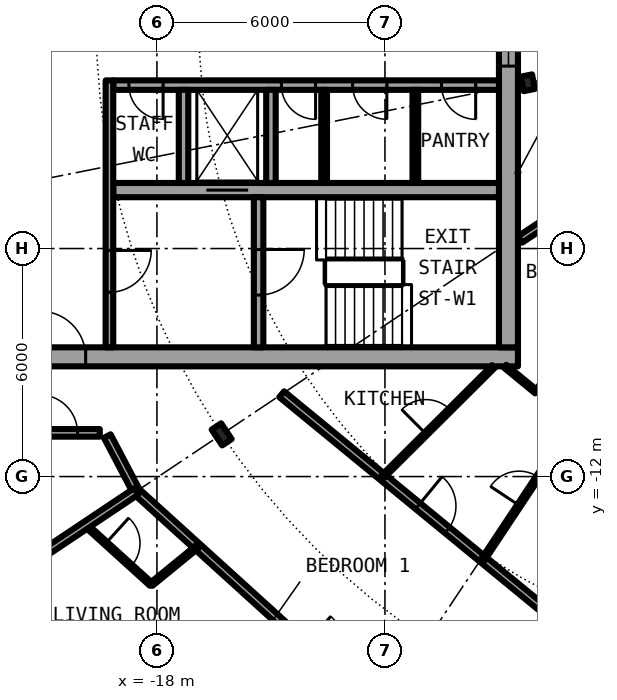
"""IFC4 building model, lengths in metres.
Left out: names, types, materials, properties, quantities, classifications, styles, units other than length and angle.
Written with IfcOpenShell. Run it as: python <this file> out.ifc"""

import sys

from ifc_helpers import new_model, si_unit, direction, frame, frame_2d, origin, origin_2d, place, context, subcontext, project, spatial, rectangle, i_section, extrude, element, fill, save


model = new_model("IFC4")
c1 = context("Model", 3, precision=1e-05, world=origin(), true_north=direction((0.0, 1.0)))
c2 = subcontext(c1, "Body", "Model", "MODEL_VIEW")
j1 = project(units=[si_unit("LENGTHUNIT", "METRE"), si_unit("PLANEANGLEUNIT", "RADIAN")], contexts=[c1])
p1 = place(None, origin())
s1 = spatial("IfcSite", under=j1, at=p1, CompositionType="ELEMENT")
p2 = place(p1, origin())
s2 = spatial("IfcBuilding", under=s1, at=p2, CompositionType="ELEMENT")
p3 = place(p2, frame((0.0, 0.0, 161.6)))
s3 = spatial("IfcBuildingStorey", under=s2, at=p3, CompositionType="ELEMENT", Elevation=161.6)
p4 = place(p3, frame((-16.297, -10.889, 0.0), z_axis=(0.0, 0.0, 1.0), x_axis=(-0.831469612303, -0.55557023302, 0.0)))
e1 = element("IfcColumn", 1, at=p4, inside=s3, PredefinedType="COLUMN", context=c2, shape_type="SweptSolid", body=[
    extrude(i_section(OverallWidth=0.3, OverallDepth=0.5, WebThickness=0.014, FlangeThickness=0.028, FilletRadius=0.027, at=origin_2d()), origin(), (0.0, 0.0, 1.0), 3.05),
])
p5 = place(p3, frame((-8.239, -1.639, 0.0), z_axis=(0.0, 0.0, 1.0), x_axis=(-0.980785280403, -0.195090322016, 0.0)))
e2 = element("IfcColumn", 2, at=p5, inside=s3, PredefinedType="COLUMN", context=c2, shape_type="SweptSolid", body=[
    extrude(i_section(OverallWidth=0.3, OverallDepth=0.39, WebThickness=0.011, FlangeThickness=0.019, FilletRadius=0.027, at=origin_2d()), origin(), (0.0, 0.0, 1.0), 3.05),
])
p6 = place(p3, frame((-22.699, -15.167, 0.0), z_axis=(0.0, 0.0, 1.0), x_axis=(0.634382322723, -0.773019449054, 0.0)))
e3 = element("IfcWall", 3, at=p6, inside=s3, PredefinedType="SOLIDWALL", context=c2, shape_type="SweptSolid", body=[
    extrude(rectangle(XDim=5.352, YDim=0.25, at=frame_2d((2.676, 0.0))), origin(), (0.0, 0.0, 1.0), 2.7),
])
p7 = place(p6, frame((0.441, 0.0, 0.3)))
e4 = element("IfcOpeningElement", 4, at=p7, cuts=e3, PredefinedType="OPENING", context=c2, shape_type="SweptSolid", body=[
    extrude(rectangle(XDim=1.8, YDim=2.1, at=frame_2d((0.9, 1.05))), frame((0.0, 0.135, 0.0), z_axis=(0.0, -1.0, 0.0), x_axis=(1.0, 0.0, 0.0)), (0.0, 0.0, 1.0), 0.27),
])
p8 = place(p6, frame((3.51, 0.0, 0.0)))
e5 = element("IfcOpeningElement", 5, at=p8, cuts=e3, PredefinedType="OPENING", context=c2, shape_type="SweptSolid", body=[
    extrude(rectangle(XDim=1.0, YDim=2.2, at=frame_2d((0.5, 1.1))), frame((0.0, 0.135, 0.0), z_axis=(0.0, -1.0, 0.0), x_axis=(1.0, 0.0, 0.0)), (0.0, 0.0, 1.0), 0.27),
])
p9 = place(p3, frame((-22.1, -8.85, 0.0), z_axis=(0.0, 0.0, 1.0), x_axis=(1.0, 0.0, 0.0)))
e6 = element("IfcWall", 6, at=p9, inside=s3, PredefinedType="SHEAR", context=c2, shape_type="SweptSolid", body=[
    extrude(rectangle(XDim=13.6, YDim=0.5, at=frame_2d((6.8, 0.0))), origin(), (0.0, 0.0, 1.0), 3.05),
])
p10 = place(p9, frame((1.025, 0.0, 0.0)))
e7 = element("IfcOpeningElement", 7, at=p10, cuts=e6, PredefinedType="OPENING", context=c2, shape_type="SweptSolid", body=[
    extrude(rectangle(XDim=1.2, YDim=2.3, at=frame_2d((0.6, 1.15))), frame((0.0, 0.26, 0.0), z_axis=(0.0, -1.0, 0.0), x_axis=(1.0, 0.0, 0.0)), (0.0, 0.0, 1.0), 0.52),
])
p11 = place(p3, frame((-8.75, 8.6, 0.0), z_axis=(0.0, 0.0, 1.0), x_axis=(0.0, -1.0, 0.0)))
e8 = element("IfcWall", 8, at=p11, inside=s3, PredefinedType="SHEAR", context=c2, shape_type="SweptSolid", body=[
    extrude(rectangle(XDim=17.2, YDim=0.5, at=frame_2d((8.6, 0.0))), origin(), (0.0, 0.0, 1.0), 3.05),
])
p12 = place(p11, frame((7.4, 0.0, 0.1)))
e9 = element("IfcOpeningElement", 9, at=p12, cuts=e8, PredefinedType="OPENING", context=c2, shape_type="SweptSolid", body=[
    extrude(rectangle(XDim=2.4, YDim=2.2, at=frame_2d((1.2, 1.1))), frame((0.0, 0.26, 0.0), z_axis=(0.0, -1.0, 0.0), x_axis=(1.0, 0.0, 0.0)), (0.0, 0.0, 1.0), 0.52),
])
p13 = place(p3, frame((-9.0, -1.7, 0.0), z_axis=(0.0, 0.0, 1.0), x_axis=(-1.0, 0.0, 0.0)))
e10 = element("IfcWall", 10, at=p13, inside=s3, PredefinedType="SHEAR", context=c2, shape_type="SweptSolid", body=[
    extrude(rectangle(XDim=10.15, YDim=0.25, at=frame_2d((5.075, 0.0))), origin(), (0.0, 0.0, 1.0), 3.05),
])
p14 = place(p13, frame((0.613, 0.0, 0.0)))
e11 = element("IfcOpeningElement", 11, at=p14, cuts=e10, PredefinedType="OPENING", context=c2, shape_type="SweptSolid", body=[
    extrude(rectangle(XDim=0.9, YDim=2.3, at=frame_2d((0.45, 1.15))), frame((0.0, 0.135, 0.0), z_axis=(0.0, -1.0, 0.0), x_axis=(1.0, 0.0, 0.0)), (0.0, 0.0, 1.0), 0.27),
])
p15 = place(p13, frame((2.95, 0.0, 0.0)))
e12 = element("IfcOpeningElement", 12, at=p15, cuts=e10, PredefinedType="OPENING", context=c2, shape_type="SweptSolid", body=[
    extrude(rectangle(XDim=0.9, YDim=2.3, at=frame_2d((0.45, 1.15))), frame((0.0, 0.135, 0.0), z_axis=(0.0, -1.0, 0.0), x_axis=(1.0, 0.0, 0.0)), (0.0, 0.0, 1.0), 0.27),
])
p16 = place(p13, frame((4.825, 0.0, 0.0)))
e13 = element("IfcOpeningElement", 13, at=p16, cuts=e10, PredefinedType="OPENING", context=c2, shape_type="SweptSolid", body=[
    extrude(rectangle(XDim=0.9, YDim=2.3, at=frame_2d((0.45, 1.15))), frame((0.0, 0.135, 0.0), z_axis=(0.0, -1.0, 0.0), x_axis=(1.0, 0.0, 0.0)), (0.0, 0.0, 1.0), 0.27),
])
p17 = place(p13, frame((8.837, 0.0, 0.0)))
e14 = element("IfcOpeningElement", 14, at=p17, cuts=e10, PredefinedType="OPENING", context=c2, shape_type="SweptSolid", body=[
    extrude(rectangle(XDim=0.9, YDim=2.3, at=frame_2d((0.45, 1.15))), frame((0.0, 0.135, 0.0), z_axis=(0.0, -1.0, 0.0), x_axis=(1.0, 0.0, 0.0)), (0.0, 0.0, 1.0), 0.27),
])
p18 = place(p3, frame((-9.0, -4.462, 0.0), z_axis=(0.0, 0.0, 1.0), x_axis=(-1.0, 0.0, 0.0)))
e15 = element("IfcWall", 15, at=p18, inside=s3, PredefinedType="SHEAR", context=c2, shape_type="SweptSolid", body=[
    extrude(rectangle(XDim=10.15, YDim=0.375, at=frame_2d((5.075, 0.0))), origin(), (0.0, 0.0, 1.0), 3.05),
])
p19 = place(p18, frame((6.6, 0.0, 0.0)))
e16 = element("IfcOpeningElement", 16, at=p19, cuts=e15, PredefinedType="OPENING", context=c2, shape_type="SweptSolid", body=[
    extrude(rectangle(XDim=1.1, YDim=2.3, at=frame_2d((0.55, 1.15))), frame((0.0, 0.198, 0.0), z_axis=(0.0, -1.0, 0.0), x_axis=(1.0, 0.0, 0.0)), (0.0, 0.0, 1.0), 0.395),
])
p20 = place(p3, frame((-15.325, -4.65, 0.0), z_axis=(0.0, 0.0, 1.0), x_axis=(0.0, -1.0, 0.0)))
e17 = element("IfcWall", 17, at=p20, inside=s3, PredefinedType="SHEAR", context=c2, shape_type="SweptSolid", body=[
    extrude(rectangle(XDim=3.95, YDim=0.25, at=frame_2d((1.975, 0.0))), origin(), (0.0, 0.0, 1.0), 3.05),
])
p21 = place(p20, frame((1.375, 0.0, 0.0)))
e18 = element("IfcOpeningElement", 18, at=p21, cuts=e17, PredefinedType="OPENING", context=c2, shape_type="SweptSolid", body=[
    extrude(rectangle(XDim=1.2, YDim=2.3, at=frame_2d((0.6, 1.15))), frame((0.0, 0.135, 0.0), z_axis=(0.0, -1.0, 0.0), x_axis=(1.0, 0.0, 0.0)), (0.0, 0.0, 1.0), 0.27),
])
for number, where, z_axis, x_axis in (
    (19, (-15.0, -1.825, 0.0), (0.0, 0.0, 1.0), (0.0, -1.0, 0.0)),
    (20, (-17.3, -1.825, 0.0), (0.0, 0.0, 1.0), (0.0, -1.0, 0.0)),
):
    element("IfcWall", number, at=place(p3, frame(where, z_axis=z_axis, x_axis=x_axis)), inside=s3, PredefinedType="SOLIDWALL", context=c2, shape_type="SweptSolid", body=[
        extrude(rectangle(XDim=2.45, YDim=0.25, at=frame_2d((1.225, 0.0))), origin(), (0.0, 0.0, 1.0), 2.7),
    ])
p22 = place(p3, frame((-19.25, -1.575, 0.0), z_axis=(0.0, 0.0, 1.0), x_axis=(0.0, -1.0, 0.0)))
e21 = element("IfcWall", 21, at=p22, inside=s3, PredefinedType="SOLIDWALL", context=c2, shape_type="SweptSolid", body=[
    extrude(rectangle(XDim=7.025, YDim=0.2, at=frame_2d((3.513, 0.0))), origin(), (0.0, 0.0, 1.0), 2.7),
])
p23 = place(p22, frame((4.475, 0.0, 0.0)))
e22 = element("IfcOpeningElement", 22, at=p23, cuts=e21, PredefinedType="OPENING", context=c2, shape_type="SweptSolid", body=[
    extrude(rectangle(XDim=1.1, YDim=2.3, at=frame_2d((0.55, 1.15))), frame((0.0, 0.11, 0.0), z_axis=(0.0, -1.0, 0.0), x_axis=(1.0, 0.0, 0.0)), (0.0, 0.0, 1.0), 0.22),
])
for number, where, z_axis, x_axis in (
    (23, (-11.2, -1.825, 0.0), (0.0, 0.0, 1.0), (0.0, -1.0, 0.0)),
    (24, (-13.6, -1.825, 0.0), (0.0, 0.0, 1.0), (0.0, -1.0, 0.0)),
):
    element("IfcWall", number, at=place(p3, frame(where, z_axis=z_axis, x_axis=x_axis)), inside=s3, PredefinedType="PARTITIONING", context=c2, shape_type="SweptSolid", body=[
        extrude(rectangle(XDim=2.45, YDim=0.15, at=frame_2d((1.225, 0.0))), origin(), (0.0, 0.0, 1.0), 2.7),
    ])
p24 = place(p3, frame((-19.872, -13.278, 0.0), z_axis=(0.0, 0.0, 1.0), x_axis=(0.740990220108, -0.671515817911, 0.0)))
e25 = element("IfcWall", 25, at=p24, inside=s3, PredefinedType="PARTITIONING", context=c2, shape_type="SweptSolid", body=[
    extrude(rectangle(XDim=2.323, YDim=0.1, at=frame_2d((1.161, 0.0))), origin(), (0.0, 0.0, 1.0), 2.7),
])
p25 = place(p24, frame((0.711, 0.0, 0.0)))
e26 = element("IfcOpeningElement", 26, at=p25, cuts=e25, PredefinedType="OPENING", context=c2, shape_type="SweptSolid", body=[
    extrude(rectangle(XDim=0.9, YDim=2.3, at=frame_2d((0.45, 1.15))), frame((0.0, 0.06, 0.0), z_axis=(0.0, -1.0, 0.0), x_axis=(1.0, 0.0, 0.0)), (0.0, 0.0, 1.0), 0.12),
])
p26 = place(p3, frame((-19.307, -10.935, 0.0), z_axis=(0.0, 0.0, 1.0), x_axis=(0.465605550524, -0.884992356646, 0.0)))
e27 = element("IfcWall", 27, at=p26, inside=s3, PredefinedType="PARTITIONING", context=c2, shape_type="SweptSolid", body=[
    extrude(rectangle(XDim=1.643, YDim=0.2, at=frame_2d((0.821, 0.0))), origin(), (0.0, 0.0, 1.0), 2.7),
])
p27 = place(p3, frame((-18.542, -12.389, 0.0), z_axis=(0.0, 0.0, 1.0), x_axis=(0.740947367223, -0.671563101283, 0.0)))
e28 = element("IfcWall", 28, at=p27, inside=s3, PredefinedType="PARTITIONING", context=c2, shape_type="SweptSolid", body=[
    extrude(rectangle(XDim=10.837, YDim=0.2, at=frame_2d((5.419, 0.0))), origin(), (0.0, 0.0, 1.0), 2.7),
])
p28 = place(p27, frame((6.002, 0.0, 0.0)))
e29 = element("IfcOpeningElement", 29, at=p28, cuts=e28, PredefinedType="OPENING", context=c2, shape_type="SweptSolid", body=[
    extrude(rectangle(XDim=1.0, YDim=2.3, at=frame_2d((0.5, 1.15))), frame((0.0, 0.11, 0.0), z_axis=(0.0, -1.0, 0.0), x_axis=(1.0, 0.0, 0.0)), (0.0, 0.0, 1.0), 0.22),
])
p29 = place(p3, frame((-14.717, -9.834, 0.0), z_axis=(0.0, 0.0, 1.0), x_axis=(0.773034536097, -0.634363938131, 0.0)))
e30 = element("IfcWall", 30, at=p29, inside=s3, PredefinedType="PARTITIONING", context=c2, shape_type="SweptSolid", body=[
    extrude(rectangle(XDim=10.277, YDim=0.2, at=frame_2d((5.138, 0.0))), origin(), (0.0, 0.0, 1.0), 2.7),
])
p30 = place(p29, frame((4.638, 0.0, 0.0)))
e31 = element("IfcOpeningElement", 31, at=p30, cuts=e30, PredefinedType="OPENING", context=c2, shape_type="SweptSolid", body=[
    extrude(rectangle(XDim=1.0, YDim=2.3, at=frame_2d((0.5, 1.15))), frame((0.0, 0.11, 0.0), z_axis=(0.0, -1.0, 0.0), x_axis=(1.0, 0.0, 0.0)), (0.0, 0.0, 1.0), 0.22),
])
p31 = place(p3, frame((-8.839, -9.098, 0.0), z_axis=(0.0, 0.0, 1.0), x_axis=(0.7731800648, -0.634186555673, 0.0)))
e32 = element("IfcWall", 32, at=p31, inside=s3, PredefinedType="PARTITIONING", context=c2, shape_type="SweptSolid", body=[
    extrude(rectangle(XDim=1.064, YDim=0.1, at=frame_2d((0.532, 0.0))), origin(), (0.0, 0.0, 1.0), 2.7),
])
p32 = place(p3, frame((-21.675, -10.85, 0.0), z_axis=(0.0, 0.0, 1.0), x_axis=(1.0, 0.0, 0.0)))
e33 = element("IfcWall", 33, at=p32, inside=s3, PredefinedType="PARTITIONING", context=c2, shape_type="SweptSolid", body=[
    extrude(rectangle(XDim=2.171, YDim=0.2, at=frame_2d((1.085, 0.0))), origin(), (0.0, 0.0, 1.0), 2.7),
])
p33 = place(p32, frame((0.585, 0.0, 0.0)))
e34 = element("IfcOpeningElement", 34, at=p33, cuts=e33, PredefinedType="OPENING", context=c2, shape_type="SweptSolid", body=[
    extrude(rectangle(XDim=1.0, YDim=2.3, at=frame_2d((0.5, 1.15))), frame((0.0, 0.11, 0.0), z_axis=(0.0, -1.0, 0.0), x_axis=(1.0, 0.0, 0.0)), (0.0, 0.0, 1.0), 0.22),
])
p34 = place(p3, frame((-6.513, -4.472, 0.0), z_axis=(0.0, 0.0, 1.0), x_axis=(-0.83133816625, -0.555766905579, 0.0)))
e35 = element("IfcWall", 35, at=p34, inside=s3, PredefinedType="PARTITIONING", context=c2, shape_type="SweptSolid", body=[
    extrude(rectangle(XDim=2.323, YDim=0.2, at=frame_2d((1.162, 0.0))), origin(), (0.0, 0.0, 1.0), 2.7),
])
p35 = place(p3, frame((-22.595, -15.098, 0.0), z_axis=(0.0, 0.0, 1.0), x_axis=(0.831387096605, 0.55569370664, 0.0)))
e36 = element("IfcWall", 36, at=p35, inside=s3, PredefinedType="PARTITIONING", context=c2, shape_type="SweptSolid", body=[
    extrude(rectangle(XDim=4.875, YDim=0.2, at=frame_2d((2.438, 0.0))), origin(), (0.0, 0.0, 1.0), 2.7),
])
p36 = place(p3, frame((-18.151, -14.838, 0.0), z_axis=(0.0, 0.0, 1.0), x_axis=(0.774283039722, 0.632839453889, 0.0)))
e37 = element("IfcWall", 37, at=p36, inside=s3, PredefinedType="PARTITIONING", context=c2, shape_type="SweptSolid", body=[
    extrude(rectangle(XDim=1.569, YDim=0.1, at=frame_2d((0.785, 0.0))), origin(), (0.0, 0.0, 1.0), 2.7),
])
p37 = place(p3, frame((-12.065, -12.011, 0.0), z_axis=(0.0, 0.0, 1.0), x_axis=(0.708793214553, 0.705416316088, 0.0)))
e38 = element("IfcWall", 38, at=p37, inside=s3, PredefinedType="PARTITIONING", context=c2, shape_type="SweptSolid", body=[
    extrude(rectangle(XDim=4.121, YDim=0.1, at=frame_2d((2.061, 0.0))), origin(), (0.0, 0.0, 1.0), 2.7),
])
p38 = place(p37, frame((1.611, 0.0, 0.0)))
e39 = element("IfcOpeningElement", 39, at=p38, cuts=e38, PredefinedType="OPENING", context=c2, shape_type="SweptSolid", body=[
    extrude(rectangle(XDim=0.9, YDim=2.3, at=frame_2d((0.45, 1.15))), frame((0.0, 0.06, 0.0), z_axis=(0.0, -1.0, 0.0), x_axis=(1.0, 0.0, 0.0)), (0.0, 0.0, 1.0), 0.12),
])
p39 = place(p3, frame((-9.418, -14.182, 0.0), z_axis=(0.0, 0.0, 1.0), x_axis=(0.553303732327, 0.832979579457, 0.0)))
e40 = element("IfcWall", 40, at=p39, inside=s3, PredefinedType="PARTITIONING", context=c2, shape_type="SweptSolid", body=[
    extrude(rectangle(XDim=4.319, YDim=0.1, at=frame_2d((2.16, 0.0))), origin(), (0.0, 0.0, 1.0), 2.7),
])
p40 = place(p39, frame((1.71, 0.0, 0.0)))
e41 = element("IfcOpeningElement", 41, at=p40, cuts=e40, PredefinedType="OPENING", context=c2, shape_type="SweptSolid", body=[
    extrude(rectangle(XDim=0.9, YDim=2.3, at=frame_2d((0.45, 1.15))), frame((0.0, 0.06, 0.0), z_axis=(0.0, -1.0, 0.0), x_axis=(1.0, 0.0, 0.0)), (0.0, 0.0, 1.0), 0.12),
])
p41 = place(p3, frame((-8.019, -9.771, 0.0), z_axis=(0.0, 0.0, 1.0), x_axis=(0.634401778971, 0.773003481776, 0.0)))
e42 = element("IfcWall", 42, at=p41, inside=s3, PredefinedType="PARTITIONING", context=c2, shape_type="SweptSolid", body=[
    extrude(rectangle(XDim=4.92, YDim=0.1, at=frame_2d((2.46, 0.0))), origin(), (0.0, 0.0, 1.0), 2.7),
])
p42 = place(p41, frame((2.01, 0.0, 0.0)))
e43 = element("IfcOpeningElement", 43, at=p42, cuts=e42, PredefinedType="OPENING", context=c2, shape_type="SweptSolid", body=[
    extrude(rectangle(XDim=0.9, YDim=2.3, at=frame_2d((0.45, 1.15))), frame((0.0, 0.06, 0.0), z_axis=(0.0, -1.0, 0.0), x_axis=(1.0, 0.0, 0.0)), (0.0, 0.0, 1.0), 0.12),
])
p43 = place(p19, origin())
e44 = element("IfcDoor", 44, at=p43, inside=s3, OperationType="DOUBLE_DOOR_SLIDING", PredefinedType="DOOR", context=c2, shape_type="SweptSolid", body=[
    extrude(rectangle(XDim=1.1, YDim=2.3, at=frame_2d((0.55, 1.15))), frame((0.0, 0.025, 0.0), z_axis=(0.0, -1.0, 0.0), x_axis=(1.0, 0.0, 0.0)), (0.0, 0.0, 1.0), 0.05),
])
fill(e16, e44)
p44 = place(p14, origin())
e45 = element("IfcDoor", 45, at=p44, inside=s3, OperationType="SINGLE_SWING_RIGHT", PredefinedType="DOOR", context=c2, shape_type="SweptSolid", body=[
    extrude(rectangle(XDim=0.9, YDim=2.3, at=frame_2d((0.45, 1.15))), frame((0.0, 0.025, 0.0), z_axis=(0.0, -1.0, 0.0), x_axis=(1.0, 0.0, 0.0)), (0.0, 0.0, 1.0), 0.05),
])
fill(e11, e45)
p45 = place(p15, origin())
e46 = element("IfcDoor", 46, at=p45, inside=s3, OperationType="SINGLE_SWING_RIGHT", PredefinedType="DOOR", context=c2, shape_type="SweptSolid", body=[
    extrude(rectangle(XDim=0.9, YDim=2.3, at=frame_2d((0.45, 1.15))), frame((0.0, 0.025, 0.0), z_axis=(0.0, -1.0, 0.0), x_axis=(1.0, 0.0, 0.0)), (0.0, 0.0, 1.0), 0.05),
])
fill(e12, e46)
p46 = place(p16, origin())
e47 = element("IfcDoor", 47, at=p46, inside=s3, OperationType="SINGLE_SWING_LEFT", PredefinedType="DOOR", context=c2, shape_type="SweptSolid", body=[
    extrude(rectangle(XDim=0.9, YDim=2.3, at=frame_2d((0.45, 1.15))), frame((0.0, 0.025, 0.0), z_axis=(0.0, -1.0, 0.0), x_axis=(1.0, 0.0, 0.0)), (0.0, 0.0, 1.0), 0.05),
])
fill(e13, e47)
p47 = place(p17, origin())
e48 = element("IfcDoor", 48, at=p47, inside=s3, OperationType="SINGLE_SWING_LEFT", PredefinedType="DOOR", context=c2, shape_type="SweptSolid", body=[
    extrude(rectangle(XDim=0.9, YDim=2.3, at=frame_2d((0.45, 1.15))), frame((0.0, 0.025, 0.0), z_axis=(0.0, -1.0, 0.0), x_axis=(1.0, 0.0, 0.0)), (0.0, 0.0, 1.0), 0.05),
])
fill(e14, e48)
p48 = place(p21, origin())
e49 = element("IfcDoor", 49, at=p48, inside=s3, OperationType="SINGLE_SWING_LEFT", PredefinedType="DOOR", context=c2, shape_type="SweptSolid", body=[
    extrude(rectangle(XDim=1.2, YDim=2.3, at=frame_2d((0.6, 1.15))), frame((0.0, 0.025, 0.0), z_axis=(0.0, -1.0, 0.0), x_axis=(1.0, 0.0, 0.0)), (0.0, 0.0, 1.0), 0.05),
])
fill(e18, e49)
p49 = place(p23, origin())
e50 = element("IfcDoor", 50, at=p49, inside=s3, OperationType="SINGLE_SWING_LEFT", PredefinedType="DOOR", context=c2, shape_type="SweptSolid", body=[
    extrude(rectangle(XDim=1.1, YDim=2.3, at=frame_2d((0.55, 1.15))), frame((0.0, 0.025, 0.0), z_axis=(0.0, -1.0, 0.0), x_axis=(1.0, 0.0, 0.0)), (0.0, 0.0, 1.0), 0.05),
])
fill(e22, e50)
p50 = place(p10, origin())
e51 = element("IfcDoor", 51, at=p50, inside=s3, OperationType="SINGLE_SWING_RIGHT", PredefinedType="DOOR", context=c2, shape_type="SweptSolid", body=[
    extrude(rectangle(XDim=1.2, YDim=2.3, at=frame_2d((0.6, 1.15))), frame((0.0, 0.025, 0.0), z_axis=(0.0, -1.0, 0.0), x_axis=(1.0, 0.0, 0.0)), (0.0, 0.0, 1.0), 0.05),
])
fill(e7, e51)
p51 = place(p12, origin())
e52 = element("IfcWindow", 52, at=p51, inside=s3, PartitioningType="SINGLE_PANEL", PredefinedType="WINDOW", context=c2, shape_type="SweptSolid", body=[
    extrude(rectangle(XDim=2.4, YDim=2.2, at=frame_2d((1.2, 1.1))), frame((0.0, 0.03, 0.0), z_axis=(0.0, -1.0, 0.0), x_axis=(1.0, 0.0, 0.0)), (0.0, 0.0, 1.0), 0.06),
])
fill(e9, e52)
p52 = place(p25, origin())
e53 = element("IfcDoor", 53, at=p52, inside=s3, OperationType="SINGLE_SWING_RIGHT", PredefinedType="DOOR", context=c2, shape_type="SweptSolid", body=[
    extrude(rectangle(XDim=0.9, YDim=2.3, at=frame_2d((0.45, 1.15))), frame((0.0, 0.025, 0.0), z_axis=(0.0, -1.0, 0.0), x_axis=(1.0, 0.0, 0.0)), (0.0, 0.0, 1.0), 0.05),
])
fill(e26, e53)
p53 = place(p30, origin())
e54 = element("IfcDoor", 54, at=p53, inside=s3, OperationType="SINGLE_SWING_LEFT", PredefinedType="DOOR", context=c2, shape_type="SweptSolid", body=[
    extrude(rectangle(XDim=1.0, YDim=2.3, at=frame_2d((0.5, 1.15))), frame((0.0, 0.025, 0.0), z_axis=(0.0, -1.0, 0.0), x_axis=(1.0, 0.0, 0.0)), (0.0, 0.0, 1.0), 0.05),
])
fill(e31, e54)
p54 = place(p40, origin())
e55 = element("IfcDoor", 55, at=p54, inside=s3, OperationType="SINGLE_SWING_RIGHT", PredefinedType="DOOR", context=c2, shape_type="SweptSolid", body=[
    extrude(rectangle(XDim=0.9, YDim=2.3, at=frame_2d((0.45, 1.15))), frame((0.0, 0.025, 0.0), z_axis=(0.0, -1.0, 0.0), x_axis=(1.0, 0.0, 0.0)), (0.0, 0.0, 1.0), 0.05),
])
fill(e41, e55)
p55 = place(p38, origin())
e56 = element("IfcDoor", 56, at=p55, inside=s3, OperationType="SINGLE_SWING_LEFT", PredefinedType="DOOR", context=c2, shape_type="SweptSolid", body=[
    extrude(rectangle(XDim=0.9, YDim=2.3, at=frame_2d((0.45, 1.15))), frame((0.0, 0.025, 0.0), z_axis=(0.0, -1.0, 0.0), x_axis=(1.0, 0.0, 0.0)), (0.0, 0.0, 1.0), 0.05),
])
fill(e39, e56)
p56 = place(p33, origin())
e57 = element("IfcDoor", 57, at=p56, inside=s3, OperationType="SINGLE_SWING_LEFT", PredefinedType="DOOR", context=c2, shape_type="SweptSolid", body=[
    extrude(rectangle(XDim=1.0, YDim=2.3, at=frame_2d((0.5, 1.15))), frame((0.0, 0.025, 0.0), z_axis=(0.0, -1.0, 0.0), x_axis=(1.0, 0.0, 0.0)), (0.0, 0.0, 1.0), 0.05),
])
fill(e34, e57)
save(model, sys.argv[1])
